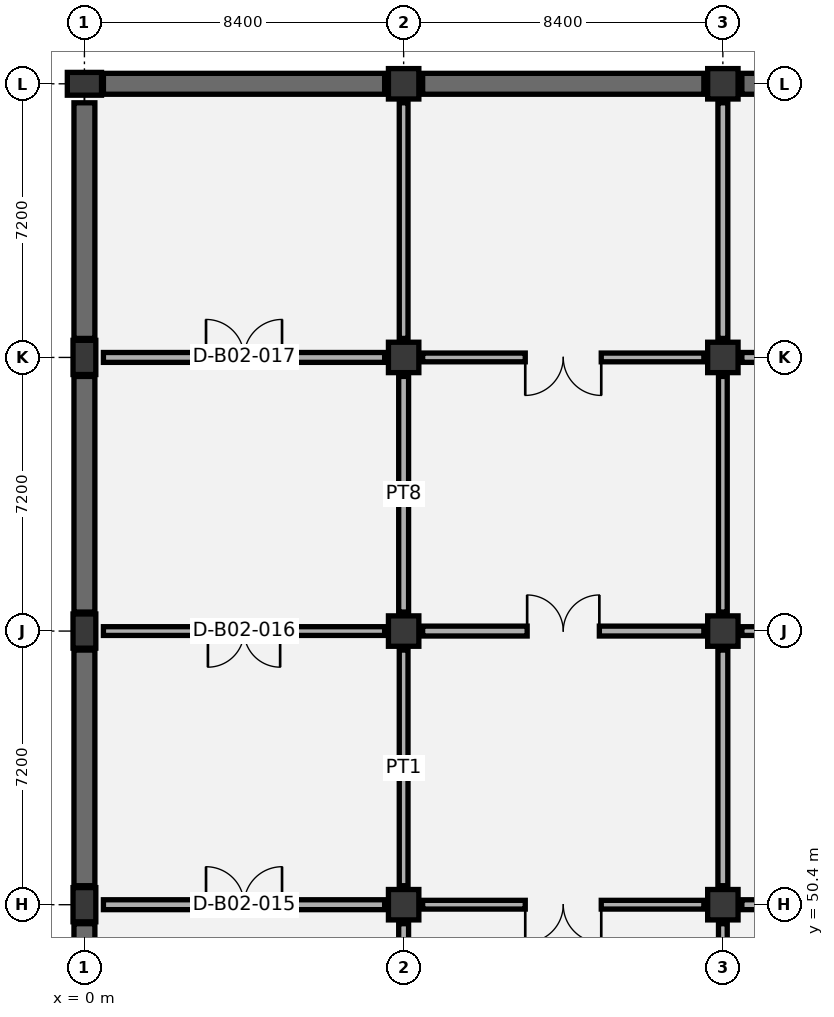
"""IFC4 building model, lengths in metres.
Left out: names, types, materials, properties, quantities, classifications, styles, units other than length and angle.
Written with IfcOpenShell. Run it as: python <this file> out.ifc"""

import sys

from ifc_helpers import new_model, si_unit, direction, frame, frame_2d, origin, origin_2d, place, context, subcontext, project, spatial, rectangle, extrude, element, fill, save


model = new_model("IFC4")
c1 = context("Model", 3, precision=1e-05, world=origin(), true_north=direction((0.0, 1.0)))
c2 = subcontext(c1, "Body", "Model", "MODEL_VIEW")
j1 = project(units=[si_unit("LENGTHUNIT", "METRE"), si_unit("PLANEANGLEUNIT", "RADIAN")], contexts=[c1])
p1 = place(None, origin())
s1 = spatial("IfcSite", under=j1, at=p1, CompositionType="ELEMENT")
p2 = place(p1, origin())
s2 = spatial("IfcBuilding", under=s1, at=p2, CompositionType="ELEMENT")
p3 = place(p2, frame((0.0, 0.0, -9.6)))
s3 = spatial("IfcBuildingStorey", under=s2, at=p3, CompositionType="ELEMENT", Elevation=-9.6)
for number, where, z_axis, x_axis in (
    (1, (0.0, 50.4, 0.0), (0.0, 0.0, 1.0), (1.0, 0.0, 0.0)),
    (2, (0.0, 57.6, 0.0), (0.0, 0.0, 1.0), (1.0, 0.0, 0.0)),
    (3, (0.0, 64.8, 0.0), (0.0, 0.0, 1.0), (1.0, 0.0, 0.0)),
    (4, (0.0, 72.0, 0.0), (0.0, 0.0, 1.0), (0.0, 1.0, 0.0)),
):
    element("IfcColumn", number, at=place(p3, frame(where, z_axis=z_axis, x_axis=x_axis)), inside=s3, PredefinedType="COLUMN", context=c2, shape_type="SweptSolid", body=[
        extrude(rectangle(XDim=0.6, YDim=0.9, at=origin_2d()), origin(), (0.0, 0.0, 1.0), 4.8),
    ])
for number, where, z_axis, x_axis in (
    (5, (8.4, 50.4, 0.0), (0.0, 0.0, 1.0), (1.0, 0.0, 0.0)),
    (6, (8.4, 57.6, 0.0), (0.0, 0.0, 1.0), (1.0, 0.0, 0.0)),
    (7, (8.4, 64.8, 0.0), (0.0, 0.0, 1.0), (1.0, 0.0, 0.0)),
    (8, (8.4, 72.0, 0.0), (0.0, 0.0, 1.0), (1.0, 0.0, 0.0)),
    (9, (16.8, 50.4, 0.0), (0.0, 0.0, 1.0), (1.0, 0.0, 0.0)),
    (10, (16.8, 57.6, 0.0), (0.0, 0.0, 1.0), (1.0, 0.0, 0.0)),
    (11, (16.8, 64.8, 0.0), (0.0, 0.0, 1.0), (1.0, 0.0, 0.0)),
    (12, (16.8, 72.0, 0.0), (0.0, 0.0, 1.0), (1.0, 0.0, 0.0)),
):
    element("IfcColumn", number, at=place(p3, frame(where, z_axis=z_axis, x_axis=x_axis)), inside=s3, PredefinedType="COLUMN", context=c2, shape_type="SweptSolid", body=[
        extrude(rectangle(XDim=0.8, YDim=0.8, at=origin_2d()), origin(), (0.0, 0.0, 1.0), 4.8),
    ])
p4 = place(p3, frame((0.0, 43.7, 0.0), z_axis=(0.0, 0.0, 1.0), x_axis=(0.0, 1.0, 0.0)))
e13 = element("IfcWall", 13, at=p4, inside=s3, PredefinedType="USERDEFINED", context=c2, shape_type="SweptSolid", body=[
    extrude(rectangle(XDim=6.2, YDim=0.55, at=frame_2d((3.1, 0.0))), origin(), (0.0, 0.0, 1.0), 4.4),
])
p5 = place(p3, frame((0.0, 50.9, 0.0), z_axis=(0.0, 0.0, 1.0), x_axis=(0.0, 1.0, 0.0)))
e14 = element("IfcWall", 14, at=p5, inside=s3, PredefinedType="USERDEFINED", context=c2, shape_type="SweptSolid", body=[
    extrude(rectangle(XDim=6.2, YDim=0.55, at=frame_2d((3.1, 0.0))), origin(), (0.0, 0.0, 1.0), 4.4),
])
p6 = place(p3, frame((0.0, 58.1, 0.0), z_axis=(0.0, 0.0, 1.0), x_axis=(0.0, 1.0, 0.0)))
e15 = element("IfcWall", 15, at=p6, inside=s3, PredefinedType="USERDEFINED", context=c2, shape_type="SweptSolid", body=[
    extrude(rectangle(XDim=6.2, YDim=0.55, at=frame_2d((3.1, 0.0))), origin(), (0.0, 0.0, 1.0), 4.4),
])
p7 = place(p3, frame((0.5, 72.0, 0.0), z_axis=(0.0, 0.0, 1.0), x_axis=(1.0, 0.0, 0.0)))
e16 = element("IfcWall", 16, at=p7, inside=s3, PredefinedType="USERDEFINED", context=c2, shape_type="SweptSolid", body=[
    extrude(rectangle(XDim=7.4, YDim=0.55, at=frame_2d((3.7, 0.0))), origin(), (0.0, 0.0, 1.0), 4.4),
])
p8 = place(p3, frame((0.0, 65.3, 0.0), z_axis=(0.0, 0.0, 1.0), x_axis=(0.0, 1.0, 0.0)))
e17 = element("IfcWall", 17, at=p8, inside=s3, PredefinedType="USERDEFINED", context=c2, shape_type="SweptSolid", body=[
    extrude(rectangle(XDim=6.2, YDim=0.55, at=frame_2d((3.1, 0.0))), origin(), (0.0, 0.0, 1.0), 4.4),
])
p9 = place(p3, frame((8.9, 72.0, 0.0), z_axis=(0.0, 0.0, 1.0), x_axis=(1.0, 0.0, 0.0)))
e18 = element("IfcWall", 18, at=p9, inside=s3, PredefinedType="USERDEFINED", context=c2, shape_type="SweptSolid", body=[
    extrude(rectangle(XDim=7.4, YDim=0.55, at=frame_2d((3.7, 0.0))), origin(), (0.0, 0.0, 1.0), 4.4),
])
p10 = place(p3, frame((17.3, 72.0, 0.0), z_axis=(0.0, 0.0, 1.0), x_axis=(1.0, 0.0, 0.0)))
e19 = element("IfcWall", 19, at=p10, inside=s3, PredefinedType="USERDEFINED", context=c2, shape_type="SweptSolid", body=[
    extrude(rectangle(XDim=7.4, YDim=0.55, at=frame_2d((3.7, 0.0))), origin(), (0.0, 0.0, 1.0), 4.4),
])
p11 = place(p3, frame((8.4, 43.7, 0.0), z_axis=(0.0, 0.0, 1.0), x_axis=(0.0, 1.0, 0.0)))
e20 = element("IfcWall", 20, at=p11, inside=s3, PredefinedType="PARTITIONING", context=c2, shape_type="SweptSolid", body=[
    extrude(rectangle(XDim=6.2, YDim=0.26, at=frame_2d((3.1, 0.0))), origin(), (0.0, 0.0, 1.0), 3.595),
])
p12 = place(p11, frame((2.15, 0.0, 0.0)))
e21 = element("IfcOpeningElement", 21, at=p12, cuts=e20, PredefinedType="OPENING", context=c2, shape_type="SweptSolid", body=[
    extrude(rectangle(XDim=1.9, YDim=2.3, at=frame_2d((0.95, 1.15))), frame((0.0, 0.14, 0.0), z_axis=(0.0, -1.0, 0.0), x_axis=(1.0, 0.0, 0.0)), (0.0, 0.0, 1.0), 0.28),
])
p13 = place(p3, frame((0.5, 50.4, 0.0), z_axis=(0.0, 0.0, 1.0), x_axis=(1.0, 0.0, 0.0)))
e22 = element("IfcWall", 22, at=p13, inside=s3, PredefinedType="PARTITIONING", context=c2, shape_type="SweptSolid", body=[
    extrude(rectangle(XDim=7.4, YDim=0.26, at=frame_2d((3.7, 0.0))), origin(), (0.0, 0.0, 1.0), 3.495),
])
p14 = place(p13, frame((2.7, 0.0, 0.0)))
e23 = element("IfcOpeningElement", 23, at=p14, cuts=e22, PredefinedType="OPENING", context=c2, shape_type="SweptSolid", body=[
    extrude(rectangle(XDim=2.0, YDim=2.35, at=frame_2d((1.0, 1.175))), frame((0.0, 0.14, 0.0), z_axis=(0.0, -1.0, 0.0), x_axis=(1.0, 0.0, 0.0)), (0.0, 0.0, 1.0), 0.28),
])
p15 = place(p3, frame((8.4, 50.9, 0.0), z_axis=(0.0, 0.0, 1.0), x_axis=(0.0, 1.0, 0.0)))
e24 = element("IfcWall", 24, at=p15, inside=s3, PredefinedType="PARTITIONING", context=c2, shape_type="SweptSolid", body=[
    extrude(rectangle(XDim=6.2, YDim=0.23, at=frame_2d((3.1, 0.0))), origin(), (0.0, 0.0, 1.0), 3.595),
])
p16 = place(p3, frame((0.5, 57.6, 0.0), z_axis=(0.0, 0.0, 1.0), x_axis=(1.0, 0.0, 0.0)))
e25 = element("IfcWall", 25, at=p16, inside=s3, PredefinedType="PARTITIONING", context=c2, shape_type="SweptSolid", body=[
    extrude(rectangle(XDim=7.4, YDim=0.23, at=frame_2d((3.7, 0.0))), origin(), (0.0, 0.0, 1.0), 3.495),
])
p17 = place(p16, frame((2.75, 0.0, 0.0)))
e26 = element("IfcOpeningElement", 26, at=p17, cuts=e25, PredefinedType="OPENING", context=c2, shape_type="SweptSolid", body=[
    extrude(rectangle(XDim=1.9, YDim=2.3, at=frame_2d((0.95, 1.15))), frame((0.0, 0.125, 0.0), z_axis=(0.0, -1.0, 0.0), x_axis=(1.0, 0.0, 0.0)), (0.0, 0.0, 1.0), 0.25),
])
p18 = place(p3, frame((8.4, 58.1, 0.0), z_axis=(0.0, 0.0, 1.0), x_axis=(0.0, 1.0, 0.0)))
e27 = element("IfcWall", 27, at=p18, inside=s3, PredefinedType="PARTITIONING", context=c2, shape_type="SweptSolid", body=[
    extrude(rectangle(XDim=6.2, YDim=0.26, at=frame_2d((3.1, 0.0))), origin(), (0.0, 0.0, 1.0), 3.595),
])
p19 = place(p3, frame((0.5, 64.8, 0.0), z_axis=(0.0, 0.0, 1.0), x_axis=(1.0, 0.0, 0.0)))
e28 = element("IfcWall", 28, at=p19, inside=s3, PredefinedType="PARTITIONING", context=c2, shape_type="SweptSolid", body=[
    extrude(rectangle(XDim=7.4, YDim=0.26, at=frame_2d((3.7, 0.0))), origin(), (0.0, 0.0, 1.0), 3.495),
])
p20 = place(p19, frame((2.7, 0.0, 0.0)))
e29 = element("IfcOpeningElement", 29, at=p20, cuts=e28, PredefinedType="OPENING", context=c2, shape_type="SweptSolid", body=[
    extrude(rectangle(XDim=2.0, YDim=2.35, at=frame_2d((1.0, 1.175))), frame((0.0, 0.14, 0.0), z_axis=(0.0, -1.0, 0.0), x_axis=(1.0, 0.0, 0.0)), (0.0, 0.0, 1.0), 0.28),
])
p21 = place(p3, frame((8.4, 65.3, 0.0), z_axis=(0.0, 0.0, 1.0), x_axis=(0.0, 1.0, 0.0)))
e30 = element("IfcWall", 30, at=p21, inside=s3, PredefinedType="PARTITIONING", context=c2, shape_type="SweptSolid", body=[
    extrude(rectangle(XDim=6.2, YDim=0.23, at=frame_2d((3.1, 0.0))), origin(), (0.0, 0.0, 1.0), 3.595),
])
p22 = place(p3, frame((16.8, 43.7, 0.0), z_axis=(0.0, 0.0, 1.0), x_axis=(0.0, 1.0, 0.0)))
e31 = element("IfcWall", 31, at=p22, inside=s3, PredefinedType="PARTITIONING", context=c2, shape_type="SweptSolid", body=[
    extrude(rectangle(XDim=6.2, YDim=0.23, at=frame_2d((3.1, 0.0))), origin(), (0.0, 0.0, 1.0), 3.595),
])
p23 = place(p22, frame((2.15, 0.0, 0.0)))
e32 = element("IfcOpeningElement", 32, at=p23, cuts=e31, PredefinedType="OPENING", context=c2, shape_type="SweptSolid", body=[
    extrude(rectangle(XDim=1.9, YDim=2.3, at=frame_2d((0.95, 1.15))), frame((0.0, 0.125, 0.0), z_axis=(0.0, -1.0, 0.0), x_axis=(1.0, 0.0, 0.0)), (0.0, 0.0, 1.0), 0.25),
])
p24 = place(p3, frame((8.9, 50.4, 0.0), z_axis=(0.0, 0.0, 1.0), x_axis=(1.0, 0.0, 0.0)))
e33 = element("IfcWall", 33, at=p24, inside=s3, PredefinedType="PARTITIONING", context=c2, shape_type="SweptSolid", body=[
    extrude(rectangle(XDim=7.4, YDim=0.23, at=frame_2d((3.7, 0.0))), origin(), (0.0, 0.0, 1.0), 3.495),
])
p25 = place(p24, frame((2.7, 0.0, 0.0)))
e34 = element("IfcOpeningElement", 34, at=p25, cuts=e33, PredefinedType="OPENING", context=c2, shape_type="SweptSolid", body=[
    extrude(rectangle(XDim=2.0, YDim=2.35, at=frame_2d((1.0, 1.175))), frame((0.0, 0.125, 0.0), z_axis=(0.0, -1.0, 0.0), x_axis=(1.0, 0.0, 0.0)), (0.0, 0.0, 1.0), 0.25),
])
p26 = place(p3, frame((16.8, 50.9, 0.0), z_axis=(0.0, 0.0, 1.0), x_axis=(0.0, 1.0, 0.0)))
e35 = element("IfcWall", 35, at=p26, inside=s3, PredefinedType="PARTITIONING", context=c2, shape_type="SweptSolid", body=[
    extrude(rectangle(XDim=6.2, YDim=0.26, at=frame_2d((3.1, 0.0))), origin(), (0.0, 0.0, 1.0), 3.595),
])
p27 = place(p3, frame((8.9, 57.6, 0.0), z_axis=(0.0, 0.0, 1.0), x_axis=(1.0, 0.0, 0.0)))
e36 = element("IfcWall", 36, at=p27, inside=s3, PredefinedType="PARTITIONING", context=c2, shape_type="SweptSolid", body=[
    extrude(rectangle(XDim=7.4, YDim=0.26, at=frame_2d((3.7, 0.0))), origin(), (0.0, 0.0, 1.0), 3.495),
])
p28 = place(p27, frame((2.75, 0.0, 0.0)))
e37 = element("IfcOpeningElement", 37, at=p28, cuts=e36, PredefinedType="OPENING", context=c2, shape_type="SweptSolid", body=[
    extrude(rectangle(XDim=1.9, YDim=2.3, at=frame_2d((0.95, 1.15))), frame((0.0, 0.14, 0.0), z_axis=(0.0, -1.0, 0.0), x_axis=(1.0, 0.0, 0.0)), (0.0, 0.0, 1.0), 0.28),
])
p29 = place(p3, frame((16.8, 58.1, 0.0), z_axis=(0.0, 0.0, 1.0), x_axis=(0.0, 1.0, 0.0)))
e38 = element("IfcWall", 38, at=p29, inside=s3, PredefinedType="PARTITIONING", context=c2, shape_type="SweptSolid", body=[
    extrude(rectangle(XDim=6.2, YDim=0.23, at=frame_2d((3.1, 0.0))), origin(), (0.0, 0.0, 1.0), 3.595),
])
p30 = place(p3, frame((8.9, 64.8, 0.0), z_axis=(0.0, 0.0, 1.0), x_axis=(1.0, 0.0, 0.0)))
e39 = element("IfcWall", 39, at=p30, inside=s3, PredefinedType="PARTITIONING", context=c2, shape_type="SweptSolid", body=[
    extrude(rectangle(XDim=7.4, YDim=0.23, at=frame_2d((3.7, 0.0))), origin(), (0.0, 0.0, 1.0), 3.495),
])
p31 = place(p30, frame((2.7, 0.0, 0.0)))
e40 = element("IfcOpeningElement", 40, at=p31, cuts=e39, PredefinedType="OPENING", context=c2, shape_type="SweptSolid", body=[
    extrude(rectangle(XDim=2.0, YDim=2.35, at=frame_2d((1.0, 1.175))), frame((0.0, 0.125, 0.0), z_axis=(0.0, -1.0, 0.0), x_axis=(1.0, 0.0, 0.0)), (0.0, 0.0, 1.0), 0.25),
])
p32 = place(p3, frame((16.8, 65.3, 0.0), z_axis=(0.0, 0.0, 1.0), x_axis=(0.0, 1.0, 0.0)))
e41 = element("IfcWall", 41, at=p32, inside=s3, PredefinedType="PARTITIONING", context=c2, shape_type="SweptSolid", body=[
    extrude(rectangle(XDim=6.2, YDim=0.26, at=frame_2d((3.1, 0.0))), origin(), (0.0, 0.0, 1.0), 3.595),
])
p33 = place(p3, frame((17.3, 50.4, 0.0), z_axis=(0.0, 0.0, 1.0), x_axis=(1.0, 0.0, 0.0)))
e42 = element("IfcWall", 42, at=p33, inside=s3, PredefinedType="PARTITIONING", context=c2, shape_type="SweptSolid", body=[
    extrude(rectangle(XDim=7.4, YDim=0.26, at=frame_2d((3.7, 0.0))), origin(), (0.0, 0.0, 1.0), 3.495),
])
p34 = place(p33, frame((2.75, 0.0, 0.0)))
e43 = element("IfcOpeningElement", 43, at=p34, cuts=e42, PredefinedType="OPENING", context=c2, shape_type="SweptSolid", body=[
    extrude(rectangle(XDim=1.9, YDim=2.3, at=frame_2d((0.95, 1.15))), frame((0.0, 0.14, 0.0), z_axis=(0.0, -1.0, 0.0), x_axis=(1.0, 0.0, 0.0)), (0.0, 0.0, 1.0), 0.28),
])
p35 = place(p3, frame((17.3, 57.6, 0.0), z_axis=(0.0, 0.0, 1.0), x_axis=(1.0, 0.0, 0.0)))
e44 = element("IfcWall", 44, at=p35, inside=s3, PredefinedType="PARTITIONING", context=c2, shape_type="SweptSolid", body=[
    extrude(rectangle(XDim=7.4, YDim=0.23, at=frame_2d((3.7, 0.0))), origin(), (0.0, 0.0, 1.0), 3.495),
])
p36 = place(p35, frame((2.7, 0.0, 0.0)))
e45 = element("IfcOpeningElement", 45, at=p36, cuts=e44, PredefinedType="OPENING", context=c2, shape_type="SweptSolid", body=[
    extrude(rectangle(XDim=2.0, YDim=2.35, at=frame_2d((1.0, 1.175))), frame((0.0, 0.125, 0.0), z_axis=(0.0, -1.0, 0.0), x_axis=(1.0, 0.0, 0.0)), (0.0, 0.0, 1.0), 0.25),
])
p37 = place(p3, frame((17.3, 64.8, 0.0), z_axis=(0.0, 0.0, 1.0), x_axis=(1.0, 0.0, 0.0)))
e46 = element("IfcWall", 46, at=p37, inside=s3, PredefinedType="PARTITIONING", context=c2, shape_type="SweptSolid", body=[
    extrude(rectangle(XDim=7.4, YDim=0.26, at=frame_2d((3.7, 0.0))), origin(), (0.0, 0.0, 1.0), 3.495),
])
p38 = place(p37, frame((2.75, 0.0, 0.0)))
e47 = element("IfcOpeningElement", 47, at=p38, cuts=e46, PredefinedType="OPENING", context=c2, shape_type="SweptSolid", body=[
    extrude(rectangle(XDim=1.9, YDim=2.3, at=frame_2d((0.95, 1.15))), frame((0.0, 0.14, 0.0), z_axis=(0.0, -1.0, 0.0), x_axis=(1.0, 0.0, 0.0)), (0.0, 0.0, 1.0), 0.28),
])
p39 = place(p14, origin())
e48 = element("IfcDoor", 48, at=p39, inside=s3, OperationType="DOUBLE_DOOR_SINGLE_SWING", PredefinedType="DOOR", context=c2, shape_type="SweptSolid", body=[
    extrude(rectangle(XDim=2.0, YDim=2.35, at=frame_2d((1.0, 1.175))), frame((0.0, 0.025, 0.0), z_axis=(0.0, -1.0, 0.0), x_axis=(1.0, 0.0, 0.0)), (0.0, 0.0, 1.0), 0.05),
])
fill(e23, e48)
p40 = place(p17, frame((1.9, 0.0, 0.0), z_axis=(0.0, 0.0, 1.0), x_axis=(-1.0, 0.0, 0.0)))
e49 = element("IfcDoor", 49, at=p40, inside=s3, OperationType="DOUBLE_DOOR_SINGLE_SWING", PredefinedType="DOOR", context=c2, shape_type="SweptSolid", body=[
    extrude(rectangle(XDim=1.9, YDim=2.3, at=frame_2d((0.95, 1.15))), frame((0.0, 0.025, 0.0), z_axis=(0.0, -1.0, 0.0), x_axis=(1.0, 0.0, 0.0)), (0.0, 0.0, 1.0), 0.05),
])
fill(e26, e49)
p41 = place(p20, origin())
e50 = element("IfcDoor", 50, at=p41, inside=s3, OperationType="DOUBLE_DOOR_SINGLE_SWING", PredefinedType="DOOR", context=c2, shape_type="SweptSolid", body=[
    extrude(rectangle(XDim=2.0, YDim=2.35, at=frame_2d((1.0, 1.175))), frame((0.0, 0.025, 0.0), z_axis=(0.0, -1.0, 0.0), x_axis=(1.0, 0.0, 0.0)), (0.0, 0.0, 1.0), 0.05),
])
fill(e29, e50)
p42 = place(p25, frame((2.0, 0.0, 0.0), z_axis=(0.0, 0.0, 1.0), x_axis=(-1.0, 0.0, 0.0)))
e51 = element("IfcDoor", 51, at=p42, inside=s3, OperationType="DOUBLE_DOOR_SINGLE_SWING", PredefinedType="DOOR", context=c2, shape_type="SweptSolid", body=[
    extrude(rectangle(XDim=2.0, YDim=2.35, at=frame_2d((1.0, 1.175))), frame((0.0, 0.025, 0.0), z_axis=(0.0, -1.0, 0.0), x_axis=(1.0, 0.0, 0.0)), (0.0, 0.0, 1.0), 0.05),
])
fill(e34, e51)
p43 = place(p28, origin())
e52 = element("IfcDoor", 52, at=p43, inside=s3, OperationType="DOUBLE_DOOR_SINGLE_SWING", PredefinedType="DOOR", context=c2, shape_type="SweptSolid", body=[
    extrude(rectangle(XDim=1.9, YDim=2.3, at=frame_2d((0.95, 1.15))), frame((0.0, 0.025, 0.0), z_axis=(0.0, -1.0, 0.0), x_axis=(1.0, 0.0, 0.0)), (0.0, 0.0, 1.0), 0.05),
])
fill(e37, e52)
p44 = place(p31, frame((2.0, 0.0, 0.0), z_axis=(0.0, 0.0, 1.0), x_axis=(-1.0, 0.0, 0.0)))
e53 = element("IfcDoor", 53, at=p44, inside=s3, OperationType="DOUBLE_DOOR_SINGLE_SWING", PredefinedType="DOOR", context=c2, shape_type="SweptSolid", body=[
    extrude(rectangle(XDim=2.0, YDim=2.35, at=frame_2d((1.0, 1.175))), frame((0.0, 0.025, 0.0), z_axis=(0.0, -1.0, 0.0), x_axis=(1.0, 0.0, 0.0)), (0.0, 0.0, 1.0), 0.05),
])
fill(e40, e53)
save(model, sys.argv[1])
